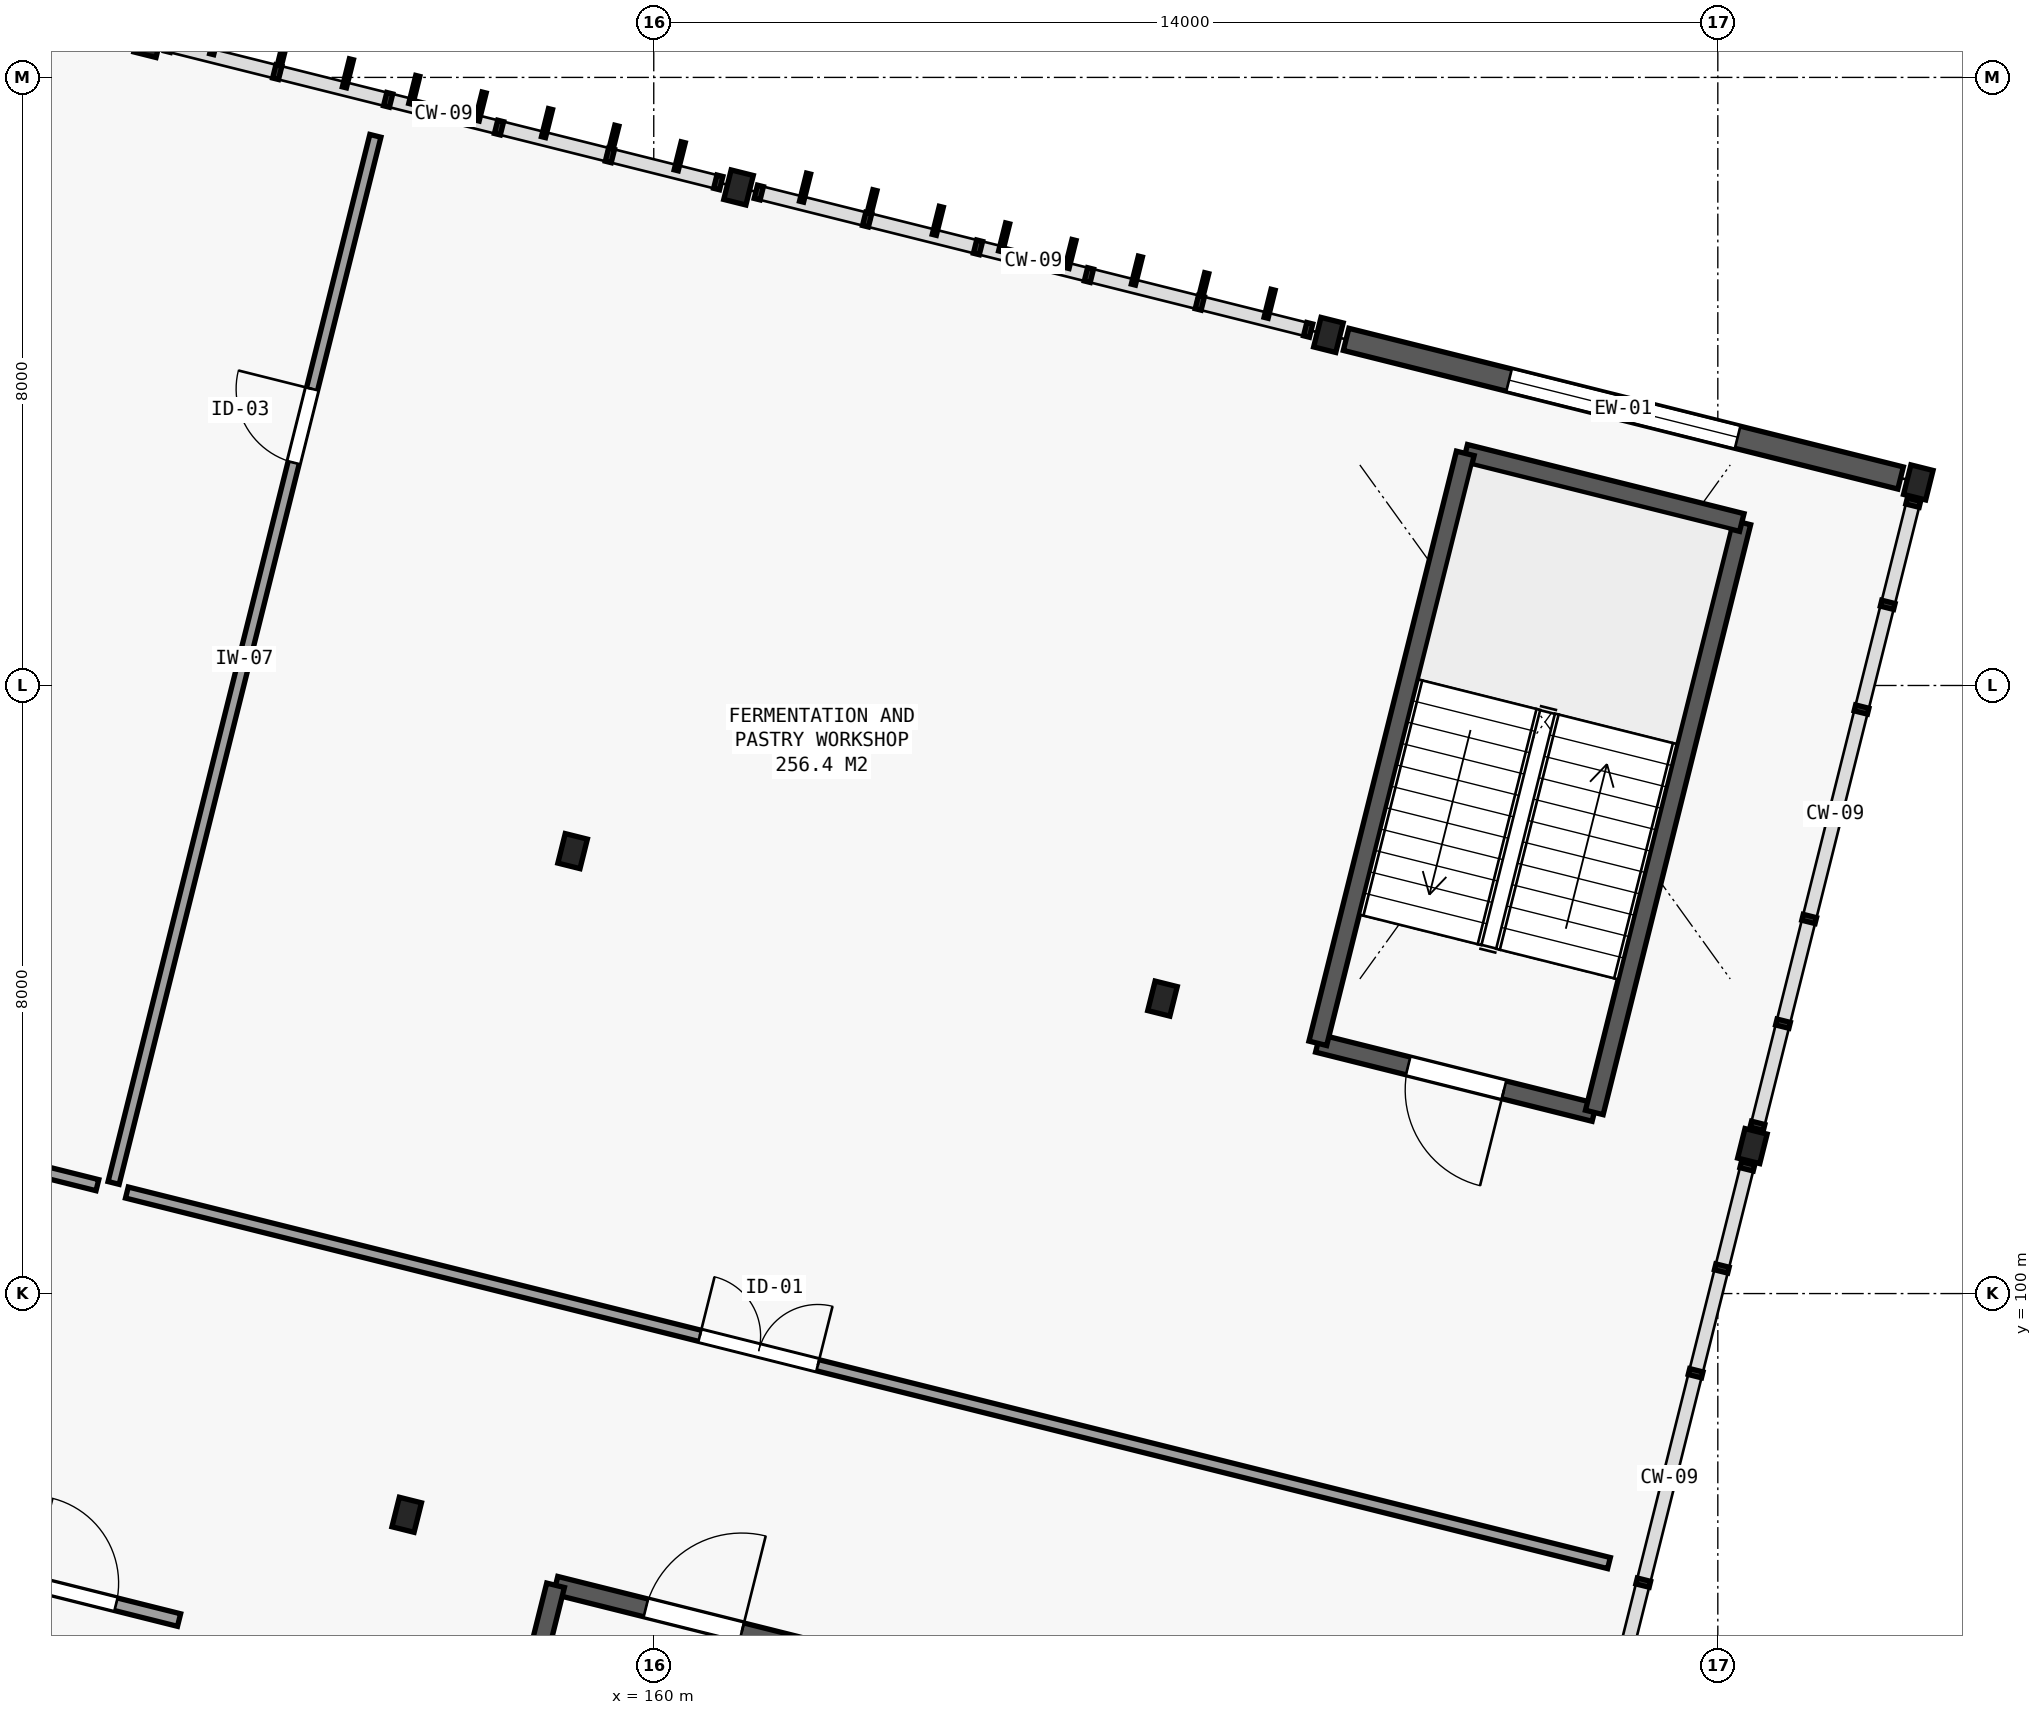
"""IFC4 building model, lengths in metres.
Left out: names, types, materials, properties, quantities, classifications, styles, units other than length and angle.
Written with IfcOpenShell. Run it as: python <this file> out.ifc"""

import sys

from ifc_helpers import new_model, si_unit, direction, frame, frame_2d, origin, origin_2d, place, context, subcontext, project, spatial, rectangle, i_section, extrude, element, fill, save


model = new_model("IFC4")
c1 = context("Model", 3, precision=1e-05, world=origin(), true_north=direction((0.0, 1.0)))
c2 = subcontext(c1, "Body", "Model", "MODEL_VIEW")
j1 = project(units=[si_unit("LENGTHUNIT", "METRE"), si_unit("PLANEANGLEUNIT", "RADIAN")], contexts=[c1])
p1 = place(None, origin())
s1 = spatial("IfcSite", under=j1, at=p1, CompositionType="ELEMENT")
p2 = place(p1, origin())
s2 = spatial("IfcBuilding", under=s1, at=p2, CompositionType="ELEMENT")
p3 = place(p2, frame((0.0, 0.0, 9.9)))
s3 = spatial("IfcBuildingStorey", under=s2, at=p3, CompositionType="ELEMENT", Elevation=9.9)
for number, where, z_axis, x_axis in (
    (1, (153.354, 116.492, 0.0), (0.0, 0.0, 1.0), (0.97, -0.243, 0.0)),
    (2, (156.75, 97.09, 0.0), (0.0, 0.0, 1.0), (0.97, -0.243, 0.0)),
    (3, (158.932, 105.821, 0.0), (0.0, 0.0, 1.0), (0.97, -0.243, 0.0)),
    (4, (161.115, 114.552, 0.0), (0.0, 0.0, 1.0), (0.97, -0.243, 0.0)),
    (5, (166.694, 103.881, 0.0), (0.0, 0.0, 1.0), (0.97, -0.243, 0.0)),
    (6, (168.876, 112.612, 0.0), (0.0, 0.0, 1.0), (0.97, -0.243, 0.0)),
    (7, (174.455, 101.94, 0.0), (0.0, 0.0, 1.0), (0.97, -0.243, 0.0)),
    (8, (176.638, 110.672, 0.0), (0.0, 0.0, 1.0), (0.97, -0.243, 0.0)),
):
    element("IfcColumn", number, at=place(p3, frame(where, z_axis=z_axis, x_axis=x_axis)), inside=s3, PredefinedType="COLUMN", context=c2, shape_type="SweptSolid", body=[
        extrude(i_section(OverallWidth=0.3, OverallDepth=0.4, WebThickness=0.013, FlangeThickness=0.024, FilletRadius=0.027, at=origin_2d()), origin(), (0.0, 0.0, 1.0), 4.2),
    ])
p4 = place(p3, frame((169.109, 112.554, 0.0), z_axis=(0.0, 0.0, 1.0), x_axis=(0.970138680536, -0.242550902961, 0.0)))
e9 = element("IfcWall", 9, at=p4, inside=s3, PredefinedType="SHEAR", context=c2, shape_type="SweptSolid", body=[
    extrude(rectangle(XDim=7.52, YDim=0.3, at=frame_2d((3.76, 0.0))), origin(), (0.0, 0.0, 1.0), 3.92),
])
p5 = place(p4, frame((2.21, 0.0, 1.0)))
e10 = element("IfcOpeningElement", 10, at=p5, cuts=e9, PredefinedType="OPENING", context=c2, shape_type="SweptSolid", body=[
    extrude(rectangle(XDim=3.1, YDim=1.75, at=frame_2d((1.55, 0.875))), frame((0.0, 0.16, 0.0), z_axis=(0.0, -1.0, 0.0), x_axis=(1.0, 0.0, 0.0)), (0.0, 0.0, 1.0), 0.32),
])
p6 = place(p3, frame((158.708, 96.162, 0.0), z_axis=(0.0, 0.0, 1.0), x_axis=(0.970150158722, -0.242504988675, 0.0)))
e11 = element("IfcWall", 11, at=p6, inside=s3, PredefinedType="SOLIDWALL", context=c2, shape_type="SweptSolid", body=[
    extrude(rectangle(XDim=3.75, YDim=0.24, at=frame_2d((1.875, 0.0))), origin(), (0.0, 0.0, 1.0), 3.945),
])
p7 = place(p6, frame((1.225, 0.0, 0.0)))
e12 = element("IfcOpeningElement", 12, at=p7, cuts=e11, PredefinedType="OPENING", context=c2, shape_type="SweptSolid", body=[
    extrude(rectangle(XDim=1.3, YDim=2.15, at=frame_2d((0.65, 1.075))), frame((0.0, 0.13, 0.0), z_axis=(0.0, -1.0, 0.0), x_axis=(1.0, 0.0, 0.0)), (0.0, 0.0, 1.0), 0.26),
])
p8 = place(p3, frame((156.768, 88.401, 0.0), z_axis=(0.0, 0.0, 1.0), x_axis=(0.242521263911, 0.970146090314, 0.0)))
e13 = element("IfcWall", 13, at=p8, inside=s3, PredefinedType="SOLIDWALL", context=c2, shape_type="SweptSolid", body=[
    extrude(rectangle(XDim=8.0, YDim=0.24, at=frame_2d((4.0, 0.0))), origin(), (0.0, 0.0, 1.0), 3.945),
])
p9 = place(p3, frame((172.375, 102.383, 0.0), z_axis=(0.0, 0.0, 1.0), x_axis=(-0.970131009923, 0.242581581301, 0.0)))
e14 = element("IfcWall", 14, at=p9, inside=s3, PredefinedType="SOLIDWALL", context=c2, shape_type="SweptSolid", body=[
    extrude(rectangle(XDim=3.75, YDim=0.24, at=frame_2d((1.875, 0.0))), origin(), (0.0, 0.0, 1.0), 3.945),
])
p10 = place(p9, frame((1.225, 0.0, 0.0)))
e15 = element("IfcOpeningElement", 15, at=p10, cuts=e14, PredefinedType="OPENING", context=c2, shape_type="SweptSolid", body=[
    extrude(rectangle(XDim=1.3, YDim=2.15, at=frame_2d((0.65, 1.075))), frame((0.0, 0.13, 0.0), z_axis=(0.0, -1.0, 0.0), x_axis=(1.0, 0.0, 0.0)), (0.0, 0.0, 1.0), 0.26),
])
p11 = place(p3, frame((174.315, 110.144, 0.0), z_axis=(0.0, 0.0, 1.0), x_axis=(-0.242521263911, -0.970146090314, 0.0)))
e16 = element("IfcWall", 16, at=p11, inside=s3, PredefinedType="SOLIDWALL", context=c2, shape_type="SweptSolid", body=[
    extrude(rectangle(XDim=8.0, YDim=0.24, at=frame_2d((4.0, 0.0))), origin(), (0.0, 0.0, 1.0), 3.945),
])
p12 = place(p3, frame((170.677, 111.054, 0.0), z_axis=(0.0, 0.0, 1.0), x_axis=(0.970131009923, -0.242581581301, 0.0)))
e17 = element("IfcWall", 17, at=p12, inside=s3, PredefinedType="SOLIDWALL", context=c2, shape_type="SweptSolid", body=[
    extrude(rectangle(XDim=3.75, YDim=0.24, at=frame_2d((1.875, 0.0))), origin(), (0.0, 0.0, 1.0), 3.945),
])
p13 = place(p3, frame((168.737, 103.292, 0.0), z_axis=(0.0, 0.0, 1.0), x_axis=(0.242521263911, 0.970146090314, 0.0)))
e18 = element("IfcWall", 18, at=p13, inside=s3, PredefinedType="SOLIDWALL", context=c2, shape_type="SweptSolid", body=[
    extrude(rectangle(XDim=8.0, YDim=0.24, at=frame_2d((4.0, 0.0))), origin(), (0.0, 0.0, 1.0), 3.945),
])
p14 = place(p3, frame((150.98, 96.398, 0.0), z_axis=(0.0, 0.0, 1.0), x_axis=(0.970147521275, -0.242515539634, 0.0)))
e19 = element("IfcWall", 19, at=p14, inside=s3, PredefinedType="PARTITIONING", context=c2, shape_type="SweptSolid", body=[
    extrude(rectangle(XDim=2.86, YDim=0.17, at=frame_2d((1.43, 0.0))), origin(), (0.0, 0.0, 1.0), 3.94),
])
p15 = place(p14, frame((0.855, 0.0, 0.0)))
e20 = element("IfcOpeningElement", 20, at=p15, cuts=e19, PredefinedType="OPENING", context=c2, shape_type="SweptSolid", body=[
    extrude(rectangle(XDim=1.15, YDim=2.15, at=frame_2d((0.575, 1.075))), frame((0.0, 0.095, 0.0), z_axis=(0.0, -1.0, 0.0), x_axis=(1.0, 0.0, 0.0)), (0.0, 0.0, 1.0), 0.19),
])
p16 = place(p3, frame((132.695, 106.422, 0.0), z_axis=(0.0, 0.0, 1.0), x_axis=(0.970141105834, -0.242541202215, 0.0)))
e21 = element("IfcWall", 21, at=p16, inside=s3, PredefinedType="PARTITIONING", context=c2, shape_type="SweptSolid", body=[
    extrude(rectangle(XDim=20.6, YDim=0.15, at=frame_2d((10.3, 0.0))), origin(), (0.0, 0.0, 1.0), 3.495),
])
p17 = place(p16, frame((4.94, 0.0, 0.0)))
e22 = element("IfcOpeningElement", 22, at=p17, cuts=e21, PredefinedType="OPENING", context=c2, shape_type="SweptSolid", body=[
    extrude(rectangle(XDim=1.6, YDim=2.2, at=frame_2d((0.8, 1.1))), frame((0.0, 0.085, 0.0), z_axis=(0.0, -1.0, 0.0), x_axis=(1.0, 0.0, 0.0)), (0.0, 0.0, 1.0), 0.17),
])
p18 = place(p3, frame((153.068, 101.329, 0.0), z_axis=(0.0, 0.0, 1.0), x_axis=(0.970142500145, -0.242535625036, 0.0)))
e23 = element("IfcWall", 23, at=p18, inside=s3, PredefinedType="PARTITIONING", context=c2, shape_type="SweptSolid", body=[
    extrude(rectangle(XDim=20.1, YDim=0.15, at=frame_2d((10.05, 0.0))), origin(), (0.0, 0.0, 1.0), 3.495),
])
p19 = place(p18, frame((7.77, 0.0, 0.0)))
e24 = element("IfcOpeningElement", 24, at=p19, cuts=e23, PredefinedType="OPENING", context=c2, shape_type="SweptSolid", body=[
    extrude(rectangle(XDim=1.6, YDim=2.2, at=frame_2d((0.8, 1.1))), frame((0.0, 0.085, 0.0), z_axis=(0.0, -1.0, 0.0), x_axis=(1.0, 0.0, 0.0)), (0.0, 0.0, 1.0), 0.17),
])
p20 = place(p3, frame((152.893, 101.455, 0.0), z_axis=(0.0, 0.0, 1.0), x_axis=(0.24254371592, 0.970140477388, 0.0)))
e25 = element("IfcWall", 25, at=p20, inside=s3, PredefinedType="PARTITIONING", context=c2, shape_type="SweptSolid", body=[
    extrude(rectangle(XDim=14.2, YDim=0.15, at=frame_2d((7.1, 0.0))), origin(), (0.0, 0.0, 1.0), 3.94),
])
p21 = place(p20, frame((9.768, 0.0, 0.0)))
e26 = element("IfcOpeningElement", 26, at=p21, cuts=e25, PredefinedType="OPENING", context=c2, shape_type="SweptSolid", body=[
    extrude(rectangle(XDim=1.0, YDim=2.15, at=frame_2d((0.5, 1.075))), frame((0.0, 0.085, 0.0), z_axis=(0.0, -1.0, 0.0), x_axis=(1.0, 0.0, 0.0)), (0.0, 0.0, 1.0), 0.17),
])
p22 = place(p5, origin())
e27 = element("IfcWindow", 27, at=p22, inside=s3, PartitioningType="SINGLE_PANEL", PredefinedType="WINDOW", context=c2, shape_type="SweptSolid", body=[
    extrude(rectangle(XDim=3.1, YDim=1.75, at=frame_2d((1.55, 0.875))), frame((0.0, 0.03, 0.0), z_axis=(0.0, -1.0, 0.0), x_axis=(1.0, 0.0, 0.0)), (0.0, 0.0, 1.0), 0.06),
])
fill(e10, e27)
p23 = place(p7, origin())
e28 = element("IfcDoor", 28, at=p23, inside=s3, OperationType="SINGLE_SWING_RIGHT", PredefinedType="DOOR", context=c2, shape_type="SweptSolid", body=[
    extrude(rectangle(XDim=1.3, YDim=2.15, at=frame_2d((0.65, 1.075))), frame((0.0, 0.025, 0.0), z_axis=(0.0, -1.0, 0.0), x_axis=(1.0, 0.0, 0.0)), (0.0, 0.0, 1.0), 0.05),
])
fill(e12, e28)
p24 = place(p10, origin())
e29 = element("IfcDoor", 29, at=p24, inside=s3, OperationType="SINGLE_SWING_LEFT", PredefinedType="DOOR", context=c2, shape_type="SweptSolid", body=[
    extrude(rectangle(XDim=1.3, YDim=2.15, at=frame_2d((0.65, 1.075))), frame((0.0, 0.025, 0.0), z_axis=(0.0, -1.0, 0.0), x_axis=(1.0, 0.0, 0.0)), (0.0, 0.0, 1.0), 0.05),
])
fill(e15, e29)
p25 = place(p15, origin())
e30 = element("IfcDoor", 30, at=p25, inside=s3, OperationType="SINGLE_SWING_LEFT", PredefinedType="DOOR", context=c2, shape_type="SweptSolid", body=[
    extrude(rectangle(XDim=1.15, YDim=2.15, at=frame_2d((0.575, 1.075))), frame((0.0, 0.025, 0.0), z_axis=(0.0, -1.0, 0.0), x_axis=(1.0, 0.0, 0.0)), (0.0, 0.0, 1.0), 0.05),
])
fill(e20, e30)
p26 = place(p19, origin())
e31 = element("IfcDoor", 31, at=p26, inside=s3, OperationType="DOUBLE_DOOR_SINGLE_SWING", PredefinedType="DOOR", context=c2, shape_type="SweptSolid", body=[
    extrude(rectangle(XDim=1.6, YDim=2.2, at=frame_2d((0.8, 1.1))), frame((0.0, 0.025, 0.0), z_axis=(0.0, -1.0, 0.0), x_axis=(1.0, 0.0, 0.0)), (0.0, 0.0, 1.0), 0.05),
])
fill(e24, e31)
p27 = place(p21, origin())
e32 = element("IfcDoor", 32, at=p27, inside=s3, OperationType="SINGLE_SWING_RIGHT", PredefinedType="DOOR", context=c2, shape_type="SweptSolid", body=[
    extrude(rectangle(XDim=1.0, YDim=2.15, at=frame_2d((0.5, 1.075))), frame((0.0, 0.025, 0.0), z_axis=(0.0, -1.0, 0.0), x_axis=(1.0, 0.0, 0.0)), (0.0, 0.0, 1.0), 0.05),
])
fill(e26, e32)
save(model, sys.argv[1])
